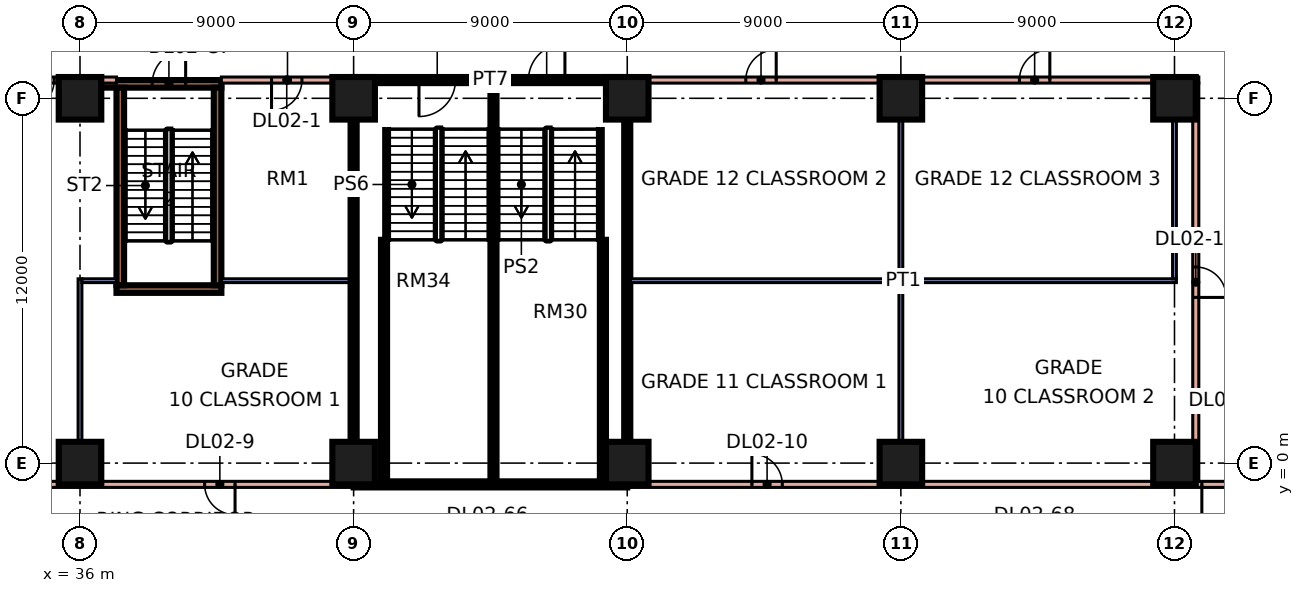
"""IFC4 building model, lengths in metres.
Left out: names, types, materials, properties, quantities, classifications, styles, units other than length and angle.
Written with IfcOpenShell. Run it as: python <this file> out.ifc"""

import sys

from ifc_helpers import new_model, si_unit, direction, frame, frame_2d, origin, origin_2d, place, context, subcontext, project, spatial, rectangle, extrude, element, fill, save


model = new_model("IFC4")
c1 = context("Model", 3, precision=1e-05, world=origin(), true_north=direction((0.0, 1.0)))
c2 = subcontext(c1, "Body", "Model", "MODEL_VIEW")
j1 = project(units=[si_unit("LENGTHUNIT", "METRE"), si_unit("PLANEANGLEUNIT", "RADIAN")], contexts=[c1])
p1 = place(None, origin())
s1 = spatial("IfcSite", under=j1, at=p1, CompositionType="ELEMENT")
p2 = place(p1, origin())
s2 = spatial("IfcBuilding", under=s1, at=p2, CompositionType="ELEMENT")
p3 = place(p2, frame((0.0, 0.0, 12.0)))
s3 = spatial("IfcBuildingStorey", under=s2, at=p3, CompositionType="ELEMENT", Elevation=12.0)
for number, where, z_axis, x_axis in (
    (1, (36.0, 0.0, 0.0), (0.0, 0.0, 1.0), (1.0, 0.0, 0.0)),
    (2, (45.0, 0.0, 0.0), (0.0, 0.0, 1.0), (1.0, 0.0, 0.0)),
    (3, (54.0, 0.0, 0.0), (0.0, 0.0, 1.0), (1.0, 0.0, 0.0)),
    (4, (63.0, 0.0, 0.0), (0.0, 0.0, 1.0), (1.0, 0.0, 0.0)),
    (5, (72.0, 0.0, 0.0), (0.0, 0.0, 1.0), (1.0, 0.0, 0.0)),
    (6, (36.0, 12.0, 0.0), (0.0, 0.0, 1.0), (1.0, 0.0, 0.0)),
    (7, (45.0, 12.0, 0.0), (0.0, 0.0, 1.0), (1.0, 0.0, 0.0)),
    (8, (54.0, 12.0, 0.0), (0.0, 0.0, 1.0), (1.0, 0.0, 0.0)),
    (9, (63.0, 12.0, 0.0), (0.0, 0.0, 1.0), (1.0, 0.0, 0.0)),
    (10, (72.0, 12.0, 0.0), (0.0, 0.0, 1.0), (1.0, 0.0, 0.0)),
):
    element("IfcColumn", number, at=place(p3, frame(where, z_axis=z_axis, x_axis=x_axis)), inside=s3, PredefinedType="COLUMN", context=c2, shape_type="SweptSolid", body=[
        extrude(rectangle(XDim=1.4, YDim=1.4, at=origin_2d()), origin(), (0.0, 0.0, 1.0), 4.8),
    ])
p4 = place(p3, frame((37.2, 5.725, 0.0), z_axis=(0.0, 0.0, 1.0), x_axis=(1.0, 0.0, 0.0)))
e11 = element("IfcWall", 11, at=p4, inside=s3, PredefinedType="SHEAR", context=c2, shape_type="SweptSolid", body=[
    extrude(rectangle(XDim=3.45, YDim=0.25, at=frame_2d((1.725, 0.0))), origin(), (0.0, 0.0, 1.0), 4.8),
])
p5 = place(p3, frame((36.7, 12.475, 0.0), z_axis=(0.0, 0.0, 1.0), x_axis=(1.0, 0.0, 0.0)))
e12 = element("IfcWall", 12, at=p5, inside=s3, PredefinedType="SHEAR", context=c2, shape_type="SweptSolid", body=[
    extrude(rectangle(XDim=3.95, YDim=0.25, at=frame_2d((1.975, 0.0))), origin(), (0.0, 0.0, 1.0), 4.8),
])
p6 = place(p5, frame((1.675, 0.0, 0.0)))
e13 = element("IfcOpeningElement", 13, at=p6, cuts=e12, PredefinedType="OPENING", context=c2, shape_type="SweptSolid", body=[
    extrude(rectangle(XDim=1.1, YDim=2.2, at=frame_2d((0.55, 1.1))), frame((0.0, 0.135, 0.0), z_axis=(0.0, -1.0, 0.0), x_axis=(1.0, 0.0, 0.0)), (0.0, 0.0, 1.0), 0.27),
])
for number, where, z_axis, x_axis in (
    (14, (37.325, 5.85, 0.0), (0.0, 0.0, 1.0), (0.0, 1.0, 0.0)),
    (15, (40.525, 5.85, 0.0), (0.0, 0.0, 1.0), (0.0, 1.0, 0.0)),
):
    element("IfcWall", number, at=place(p3, frame(where, z_axis=z_axis, x_axis=x_axis)), inside=s3, PredefinedType="SHEAR", context=c2, shape_type="SweptSolid", body=[
        extrude(rectangle(XDim=6.5, YDim=0.25, at=frame_2d((3.25, 0.0))), origin(), (0.0, 0.0, 1.0), 4.8),
    ])
p7 = place(p3, frame((0.7, -0.7, 0.0), z_axis=(0.0, 0.0, 1.0), x_axis=(1.0, 0.0, 0.0)))
e16 = element("IfcWall", 16, at=p7, inside=s3, PredefinedType="PARTITIONING", context=c2, shape_type="SweptSolid", body=[
    extrude(rectangle(XDim=44.3, YDim=0.2, at=frame_2d((22.15, 0.0))), origin(), (0.0, 0.0, 1.0), 4.4),
])
p8 = place(p7, frame((39.4, 0.0, 0.0)))
e17 = element("IfcOpeningElement", 17, at=p8, cuts=e16, PredefinedType="OPENING", context=c2, shape_type="SweptSolid", body=[
    extrude(rectangle(XDim=1.0, YDim=2.1, at=frame_2d((0.5, 1.05))), frame((0.0, 0.11, 0.0), z_axis=(0.0, -1.0, 0.0), x_axis=(1.0, 0.0, 0.0)), (0.0, 0.0, 1.0), 0.22),
])
p9 = place(p7, frame((5.4, 0.0, 0.0)))
e18 = element("IfcOpeningElement", 18, at=p9, cuts=e16, PredefinedType="OPENING", context=c2, shape_type="SweptSolid", body=[
    extrude(rectangle(XDim=1.0, YDim=2.1, at=frame_2d((0.5, 1.05))), frame((0.0, 0.11, 0.0), z_axis=(0.0, -1.0, 0.0), x_axis=(1.0, 0.0, 0.0)), (0.0, 0.0, 1.0), 0.22),
])
p10 = place(p7, frame((16.9, 0.0, 0.0)))
e19 = element("IfcOpeningElement", 19, at=p10, cuts=e16, PredefinedType="OPENING", context=c2, shape_type="SweptSolid", body=[
    extrude(rectangle(XDim=1.0, YDim=2.1, at=frame_2d((0.5, 1.05))), frame((0.0, 0.11, 0.0), z_axis=(0.0, -1.0, 0.0), x_axis=(1.0, 0.0, 0.0)), (0.0, 0.0, 1.0), 0.22),
])
p11 = place(p7, frame((28.9, 0.0, 0.0)))
e20 = element("IfcOpeningElement", 20, at=p11, cuts=e16, PredefinedType="OPENING", context=c2, shape_type="SweptSolid", body=[
    extrude(rectangle(XDim=1.0, YDim=2.1, at=frame_2d((0.5, 1.05))), frame((0.0, 0.11, 0.0), z_axis=(0.0, -1.0, 0.0), x_axis=(1.0, 0.0, 0.0)), (0.0, 0.0, 1.0), 0.22),
])
p12 = place(p3, frame((34.0, 12.6, 0.0), z_axis=(0.0, 0.0, 1.0), x_axis=(1.0, 0.0, 0.0)))
e21 = element("IfcWall", 21, at=p12, inside=s3, PredefinedType="PARTITIONING", context=c2, shape_type="SweptSolid", body=[
    extrude(rectangle(XDim=3.2, YDim=0.2, at=frame_2d((1.6, 0.0))), origin(), (0.0, 0.0, 1.0), 4.4),
])
p13 = place(p12, frame((0.15, 0.0, 0.0)))
e22 = element("IfcOpeningElement", 22, at=p13, cuts=e21, PredefinedType="OPENING", context=c2, shape_type="SweptSolid", body=[
    extrude(rectangle(XDim=1.0, YDim=2.1, at=frame_2d((0.5, 1.05))), frame((0.0, 0.11, 0.0), z_axis=(0.0, -1.0, 0.0), x_axis=(1.0, 0.0, 0.0)), (0.0, 0.0, 1.0), 0.22),
])
p14 = place(p3, frame((36.0, -0.6, 0.0), z_axis=(0.0, 0.0, 1.0), x_axis=(0.0, 1.0, 0.0)))
e23 = element("IfcWall", 23, at=p14, inside=s3, PredefinedType="PARTITIONING", context=c2, shape_type="SweptSolid", body=[
    extrude(rectangle(XDim=6.662, YDim=0.125, at=frame_2d((3.331, 0.0))), origin(), (0.0, 0.0, 1.0), 4.4),
])
p15 = place(p3, frame((36.062, 6.0, 0.0), z_axis=(0.0, 0.0, 1.0), x_axis=(1.0, 0.0, 0.0)))
e24 = element("IfcWall", 24, at=p15, inside=s3, PredefinedType="PARTITIONING", context=c2, shape_type="SweptSolid", body=[
    extrude(rectangle(XDim=1.138, YDim=0.125, at=frame_2d((0.569, 0.0))), origin(), (0.0, 0.0, 1.0), 4.4),
])
p16 = place(p3, frame((40.65, 6.0, 0.0), z_axis=(0.0, 0.0, 1.0), x_axis=(1.0, 0.0, 0.0)))
e25 = element("IfcWall", 25, at=p16, inside=s3, PredefinedType="PARTITIONING", context=c2, shape_type="SweptSolid", body=[
    extrude(rectangle(XDim=4.25, YDim=0.125, at=frame_2d((2.125, 0.0))), origin(), (0.0, 0.0, 1.0), 4.4),
])
p17 = place(p3, frame((40.65, 12.6, 0.0), z_axis=(0.0, 0.0, 1.0), x_axis=(1.0, 0.0, 0.0)))
e26 = element("IfcWall", 26, at=p17, inside=s3, PredefinedType="PARTITIONING", context=c2, shape_type="SweptSolid", body=[
    extrude(rectangle(XDim=4.35, YDim=0.2, at=frame_2d((2.175, 0.0))), origin(), (0.0, 0.0, 1.0), 4.4),
])
p18 = place(p17, frame((1.65, 0.0, 0.0)))
e27 = element("IfcOpeningElement", 27, at=p18, cuts=e26, PredefinedType="OPENING", context=c2, shape_type="SweptSolid", body=[
    extrude(rectangle(XDim=1.0, YDim=2.1, at=frame_2d((0.5, 1.05))), frame((0.0, 0.11, 0.0), z_axis=(0.0, -1.0, 0.0), x_axis=(1.0, 0.0, 0.0)), (0.0, 0.0, 1.0), 0.22),
])
p19 = place(p3, frame((45.0, -0.7, 0.0), z_axis=(0.0, 0.0, 1.0), x_axis=(1.0, 0.0, 0.0)))
e28 = element("IfcWall", 28, at=p19, inside=s3, PredefinedType="SOLIDWALL", context=c2, shape_type="SweptSolid", body=[
    extrude(rectangle(XDim=9.0, YDim=0.2, at=frame_2d((4.5, 0.0))), origin(), (0.0, 0.0, 1.0), 4.4),
])
p20 = place(p3, frame((45.0, -0.6, 0.0), z_axis=(0.0, 0.0, 1.0), x_axis=(0.0, 1.0, 0.0)))
e29 = element("IfcWall", 29, at=p20, inside=s3, PredefinedType="SOLIDWALL", context=c2, shape_type="SweptSolid", body=[
    extrude(rectangle(XDim=13.1, YDim=0.2, at=frame_2d((6.55, 0.0))), origin(), (0.0, 0.0, 1.0), 4.4),
])
p21 = place(p3, frame((45.0, 12.6, 0.0), z_axis=(0.0, 0.0, 1.0), x_axis=(1.0, 0.0, 0.0)))
e30 = element("IfcWall", 30, at=p21, inside=s3, PredefinedType="SOLIDWALL", context=c2, shape_type="SweptSolid", body=[
    extrude(rectangle(XDim=9.0, YDim=0.2, at=frame_2d((4.5, 0.0))), origin(), (0.0, 0.0, 1.0), 4.4),
])
p22 = place(p21, frame((5.75, 0.0, 0.0)))
e31 = element("IfcOpeningElement", 31, at=p22, cuts=e30, PredefinedType="OPENING", context=c2, shape_type="SweptSolid", body=[
    extrude(rectangle(XDim=1.2, YDim=2.1, at=frame_2d((0.6, 1.05))), frame((0.0, 0.11, 0.0), z_axis=(0.0, -1.0, 0.0), x_axis=(1.0, 0.0, 0.0)), (0.0, 0.0, 1.0), 0.22),
])
p23 = place(p21, frame((2.15, 0.0, 0.0)))
e32 = element("IfcOpeningElement", 32, at=p23, cuts=e30, PredefinedType="OPENING", context=c2, shape_type="SweptSolid", body=[
    extrude(rectangle(XDim=1.2, YDim=2.1, at=frame_2d((0.6, 1.05))), frame((0.0, 0.11, 0.0), z_axis=(0.0, -1.0, 0.0), x_axis=(1.0, 0.0, 0.0)), (0.0, 0.0, 1.0), 0.22),
])
p24 = place(p3, frame((49.6, -0.6, 0.0), z_axis=(0.0, 0.0, 1.0), x_axis=(0.0, 1.0, 0.0)))
e33 = element("IfcWall", 33, at=p24, inside=s3, PredefinedType="SOLIDWALL", context=c2, shape_type="SweptSolid", body=[
    extrude(rectangle(XDim=13.1, YDim=0.2, at=frame_2d((6.55, 0.0))), origin(), (0.0, 0.0, 1.0), 4.4),
])
p25 = place(p3, frame((54.0, -0.7, 0.0), z_axis=(0.0, 0.0, 1.0), x_axis=(1.0, 0.0, 0.0)))
e34 = element("IfcWall", 34, at=p25, inside=s3, PredefinedType="PARTITIONING", context=c2, shape_type="SweptSolid", body=[
    extrude(rectangle(XDim=21.0, YDim=0.2, at=frame_2d((10.5, 0.0))), origin(), (0.0, 0.0, 1.0), 4.4),
])
p26 = place(p25, frame((4.1, 0.0, 0.0)))
e35 = element("IfcOpeningElement", 35, at=p26, cuts=e34, PredefinedType="OPENING", context=c2, shape_type="SweptSolid", body=[
    extrude(rectangle(XDim=1.0, YDim=2.1, at=frame_2d((0.5, 1.05))), frame((0.0, 0.11, 0.0), z_axis=(0.0, -1.0, 0.0), x_axis=(1.0, 0.0, 0.0)), (0.0, 0.0, 1.0), 0.22),
])
p27 = place(p25, frame((18.9, 0.0, 0.0)))
e36 = element("IfcOpeningElement", 36, at=p27, cuts=e34, PredefinedType="OPENING", context=c2, shape_type="SweptSolid", body=[
    extrude(rectangle(XDim=1.8, YDim=2.1, at=frame_2d((0.9, 1.05))), frame((0.0, 0.11, 0.0), z_axis=(0.0, -1.0, 0.0), x_axis=(1.0, 0.0, 0.0)), (0.0, 0.0, 1.0), 0.22),
])
p28 = place(p3, frame((54.0, -0.6, 0.0), z_axis=(0.0, 0.0, 1.0), x_axis=(0.0, 1.0, 0.0)))
e37 = element("IfcWall", 37, at=p28, inside=s3, PredefinedType="SOLIDWALL", context=c2, shape_type="SweptSolid", body=[
    extrude(rectangle(XDim=13.1, YDim=0.2, at=frame_2d((6.55, 0.0))), origin(), (0.0, 0.0, 1.0), 4.4),
])
p29 = place(p3, frame((54.0, 12.6, 0.0), z_axis=(0.0, 0.0, 1.0), x_axis=(1.0, 0.0, 0.0)))
e38 = element("IfcWall", 38, at=p29, inside=s3, PredefinedType="PARTITIONING", context=c2, shape_type="SweptSolid", body=[
    extrude(rectangle(XDim=18.8, YDim=0.2, at=frame_2d((9.4, 0.0))), origin(), (0.0, 0.0, 1.0), 4.4),
])
p30 = place(p29, frame((3.9, 0.0, 0.0)))
e39 = element("IfcOpeningElement", 39, at=p30, cuts=e38, PredefinedType="OPENING", context=c2, shape_type="SweptSolid", body=[
    extrude(rectangle(XDim=1.0, YDim=2.1, at=frame_2d((0.5, 1.05))), frame((0.0, 0.11, 0.0), z_axis=(0.0, -1.0, 0.0), x_axis=(1.0, 0.0, 0.0)), (0.0, 0.0, 1.0), 0.22),
])
p31 = place(p29, frame((12.9, 0.0, 0.0)))
e40 = element("IfcOpeningElement", 40, at=p31, cuts=e38, PredefinedType="OPENING", context=c2, shape_type="SweptSolid", body=[
    extrude(rectangle(XDim=1.0, YDim=2.1, at=frame_2d((0.5, 1.05))), frame((0.0, 0.11, 0.0), z_axis=(0.0, -1.0, 0.0), x_axis=(1.0, 0.0, 0.0)), (0.0, 0.0, 1.0), 0.22),
])
p32 = place(p3, frame((54.1, 6.0, 0.0), z_axis=(0.0, 0.0, 1.0), x_axis=(1.0, 0.0, 0.0)))
e41 = element("IfcWall", 41, at=p32, inside=s3, PredefinedType="PARTITIONING", context=c2, shape_type="SweptSolid", body=[
    extrude(rectangle(XDim=17.962, YDim=0.125, at=frame_2d((8.981, 0.0))), origin(), (0.0, 0.0, 1.0), 4.4),
])
p33 = place(p3, frame((63.0, -0.6, 0.0), z_axis=(0.0, 0.0, 1.0), x_axis=(0.0, 1.0, 0.0)))
e42 = element("IfcWall", 42, at=p33, inside=s3, PredefinedType="PARTITIONING", context=c2, shape_type="SweptSolid", body=[
    extrude(rectangle(XDim=6.538, YDim=0.125, at=frame_2d((3.269, 0.0))), origin(), (0.0, 0.0, 1.0), 4.4),
])
for number, where, z_axis, x_axis in (
    (43, (63.0, 6.062, 0.0), (0.0, 0.0, 1.0), (0.0, 1.0, 0.0)),
    (44, (72.0, 6.062, 0.0), (0.0, 0.0, 1.0), (0.0, 1.0, 0.0)),
):
    element("IfcWall", number, at=place(p3, frame(where, z_axis=z_axis, x_axis=x_axis)), inside=s3, PredefinedType="PARTITIONING", context=c2, shape_type="SweptSolid", body=[
        extrude(rectangle(XDim=6.438, YDim=0.125, at=frame_2d((3.219, 0.0))), origin(), (0.0, 0.0, 1.0), 4.4),
    ])
p34 = place(p3, frame((72.7, -0.6, 0.0), z_axis=(0.0, 0.0, 1.0), x_axis=(0.0, 1.0, 0.0)))
e45 = element("IfcWall", 45, at=p34, inside=s3, PredefinedType="PARTITIONING", context=c2, shape_type="SweptSolid", body=[
    extrude(rectangle(XDim=13.1, YDim=0.2, at=frame_2d((6.55, 0.0))), origin(), (0.0, 0.0, 1.0), 4.4),
])
p35 = place(p34, frame((6.05, 0.0, 0.0)))
e46 = element("IfcOpeningElement", 46, at=p35, cuts=e45, PredefinedType="OPENING", context=c2, shape_type="SweptSolid", body=[
    extrude(rectangle(XDim=1.0, YDim=2.1, at=frame_2d((0.5, 1.05))), frame((0.0, 0.11, 0.0), z_axis=(0.0, -1.0, 0.0), x_axis=(1.0, 0.0, 0.0)), (0.0, 0.0, 1.0), 0.22),
])
for number, where, z_axis, x_axis in (
    (47, (53.2, -0.6, 0.0), (0.0, 0.0, 1.0), (0.0, 1.0, 0.0)),
    (48, (46.0, -0.6, 0.0), (0.0, 0.0, 1.0), (0.0, 1.0, 0.0)),
):
    element("IfcWall", number, at=place(p3, frame(where, z_axis=z_axis, x_axis=x_axis)), inside=s3, PredefinedType="SOLIDWALL", context=c2, shape_type="SweptSolid", body=[
        extrude(rectangle(XDim=7.945, YDim=0.2, at=frame_2d((3.973, 0.0))), origin(), (0.0, 0.0, 1.0), 4.4),
    ])
p36 = place(p6, frame((1.1, 0.0, 0.0), z_axis=(0.0, 0.0, 1.0), x_axis=(-1.0, 0.0, 0.0)))
e49 = element("IfcDoor", 49, at=p36, inside=s3, OperationType="SINGLE_SWING_RIGHT", PredefinedType="DOOR", context=c2, shape_type="SweptSolid", body=[
    extrude(rectangle(XDim=1.1, YDim=2.2, at=frame_2d((0.55, 1.1))), frame((0.0, 0.025, 0.0), z_axis=(0.0, -1.0, 0.0), x_axis=(1.0, 0.0, 0.0)), (0.0, 0.0, 1.0), 0.05),
])
fill(e13, e49)
p37 = place(p18, frame((1.0, 0.0, 0.0), z_axis=(0.0, 0.0, 1.0), x_axis=(-1.0, 0.0, 0.0)))
e50 = element("IfcDoor", 50, at=p37, inside=s3, OperationType="SINGLE_SWING_LEFT", PredefinedType="DOOR", context=c2, shape_type="SweptSolid", body=[
    extrude(rectangle(XDim=1.0, YDim=2.1, at=frame_2d((0.5, 1.05))), frame((0.0, 0.025, 0.0), z_axis=(0.0, -1.0, 0.0), x_axis=(1.0, 0.0, 0.0)), (0.0, 0.0, 1.0), 0.05),
])
fill(e27, e50)
p38 = place(p30, frame((1.0, 0.0, 0.0), z_axis=(0.0, 0.0, 1.0), x_axis=(-1.0, 0.0, 0.0)))
e51 = element("IfcDoor", 51, at=p38, inside=s3, OperationType="SINGLE_SWING_RIGHT", PredefinedType="DOOR", context=c2, shape_type="SweptSolid", body=[
    extrude(rectangle(XDim=1.0, YDim=2.1, at=frame_2d((0.5, 1.05))), frame((0.0, 0.025, 0.0), z_axis=(0.0, -1.0, 0.0), x_axis=(1.0, 0.0, 0.0)), (0.0, 0.0, 1.0), 0.05),
])
fill(e39, e51)
p39 = place(p31, frame((1.0, 0.0, 0.0), z_axis=(0.0, 0.0, 1.0), x_axis=(-1.0, 0.0, 0.0)))
e52 = element("IfcDoor", 52, at=p39, inside=s3, OperationType="SINGLE_SWING_RIGHT", PredefinedType="DOOR", context=c2, shape_type="SweptSolid", body=[
    extrude(rectangle(XDim=1.0, YDim=2.1, at=frame_2d((0.5, 1.05))), frame((0.0, 0.025, 0.0), z_axis=(0.0, -1.0, 0.0), x_axis=(1.0, 0.0, 0.0)), (0.0, 0.0, 1.0), 0.05),
])
fill(e40, e52)
p40 = place(p8, origin())
e53 = element("IfcDoor", 53, at=p40, inside=s3, OperationType="SINGLE_SWING_RIGHT", PredefinedType="DOOR", context=c2, shape_type="SweptSolid", body=[
    extrude(rectangle(XDim=1.0, YDim=2.1, at=frame_2d((0.5, 1.05))), frame((0.0, 0.025, 0.0), z_axis=(0.0, -1.0, 0.0), x_axis=(1.0, 0.0, 0.0)), (0.0, 0.0, 1.0), 0.05),
])
fill(e17, e53)
p41 = place(p26, origin())
e54 = element("IfcDoor", 54, at=p41, inside=s3, OperationType="SINGLE_SWING_LEFT", PredefinedType="DOOR", context=c2, shape_type="SweptSolid", body=[
    extrude(rectangle(XDim=1.0, YDim=2.1, at=frame_2d((0.5, 1.05))), frame((0.0, 0.025, 0.0), z_axis=(0.0, -1.0, 0.0), x_axis=(1.0, 0.0, 0.0)), (0.0, 0.0, 1.0), 0.05),
])
fill(e35, e54)
p42 = place(p35, frame((1.0, 0.0, 0.0), z_axis=(0.0, 0.0, 1.0), x_axis=(-1.0, 0.0, 0.0)))
e55 = element("IfcDoor", 55, at=p42, inside=s3, OperationType="SINGLE_SWING_LEFT", PredefinedType="DOOR", context=c2, shape_type="SweptSolid", body=[
    extrude(rectangle(XDim=1.0, YDim=2.1, at=frame_2d((0.5, 1.05))), frame((0.0, 0.025, 0.0), z_axis=(0.0, -1.0, 0.0), x_axis=(1.0, 0.0, 0.0)), (0.0, 0.0, 1.0), 0.05),
])
fill(e46, e55)
p43 = place(p27, frame((1.8, 0.0, 0.0), z_axis=(0.0, 0.0, 1.0), x_axis=(-1.0, 0.0, 0.0)))
e56 = element("IfcDoor", 56, at=p43, inside=s3, OperationType="DOUBLE_DOOR_SINGLE_SWING", PredefinedType="DOOR", context=c2, shape_type="SweptSolid", body=[
    extrude(rectangle(XDim=1.8, YDim=2.1, at=frame_2d((0.9, 1.05))), frame((0.0, 0.025, 0.0), z_axis=(0.0, -1.0, 0.0), x_axis=(1.0, 0.0, 0.0)), (0.0, 0.0, 1.0), 0.05),
])
fill(e36, e56)
p44 = place(p13, frame((1.0, 0.0, 0.0), z_axis=(0.0, 0.0, 1.0), x_axis=(-1.0, 0.0, 0.0)))
e57 = element("IfcDoor", 57, at=p44, inside=s3, OperationType="SINGLE_SWING_LEFT", PredefinedType="DOOR", context=c2, shape_type="SweptSolid", body=[
    extrude(rectangle(XDim=1.0, YDim=2.1, at=frame_2d((0.5, 1.05))), frame((0.0, 0.025, 0.0), z_axis=(0.0, -1.0, 0.0), x_axis=(1.0, 0.0, 0.0)), (0.0, 0.0, 1.0), 0.05),
])
fill(e22, e57)
p45 = place(p22, frame((1.2, 0.0, 0.0), z_axis=(0.0, 0.0, 1.0), x_axis=(-1.0, 0.0, 0.0)))
e58 = element("IfcDoor", 58, at=p45, inside=s3, OperationType="SINGLE_SWING_RIGHT", PredefinedType="DOOR", context=c2, shape_type="SweptSolid", body=[
    extrude(rectangle(XDim=1.2, YDim=2.1, at=frame_2d((0.6, 1.05))), frame((0.0, 0.025, 0.0), z_axis=(0.0, -1.0, 0.0), x_axis=(1.0, 0.0, 0.0)), (0.0, 0.0, 1.0), 0.05),
])
fill(e31, e58)
p46 = place(p23, frame((1.2, 0.0, 0.0), z_axis=(0.0, 0.0, 1.0), x_axis=(-1.0, 0.0, 0.0)))
e59 = element("IfcDoor", 59, at=p46, inside=s3, OperationType="SINGLE_SWING_LEFT", PredefinedType="DOOR", context=c2, shape_type="SweptSolid", body=[
    extrude(rectangle(XDim=1.2, YDim=2.1, at=frame_2d((0.6, 1.05))), frame((0.0, 0.025, 0.0), z_axis=(0.0, -1.0, 0.0), x_axis=(1.0, 0.0, 0.0)), (0.0, 0.0, 1.0), 0.05),
])
fill(e32, e59)
save(model, sys.argv[1])
